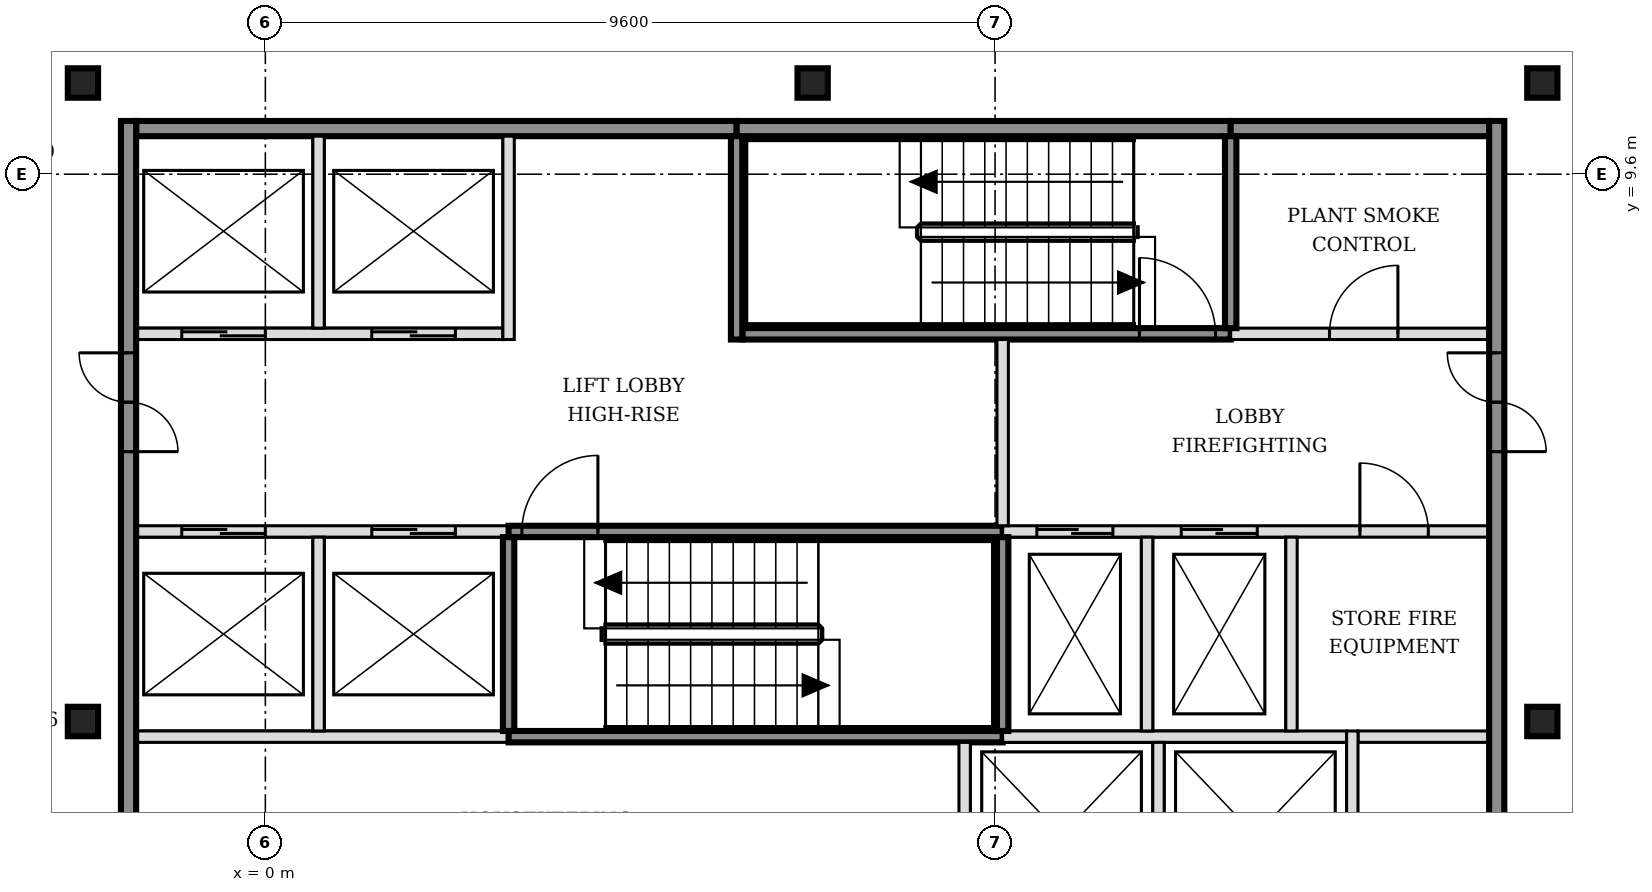
"""IFC4 building model, lengths in metres.
Left out: names, types, materials, properties, quantities, classifications, styles, units other than length and angle.
Written with IfcOpenShell. Run it as: python <this file> out.ifc"""

import sys

from ifc_helpers import new_model, si_unit, direction, frame, frame_2d, origin, origin_2d, place, context, subcontext, project, spatial, rectangle, i_section, extrude, element, fill, save


model = new_model("IFC4")
c1 = context("Model", 3, precision=1e-05, world=origin(), true_north=direction((0.0, 1.0)))
c2 = subcontext(c1, "Body", "Model", "MODEL_VIEW")
j1 = project(units=[si_unit("LENGTHUNIT", "METRE"), si_unit("PLANEANGLEUNIT", "RADIAN")], contexts=[c1])
p1 = place(None, origin())
s1 = spatial("IfcSite", under=j1, at=p1, CompositionType="ELEMENT")
p2 = place(p1, origin())
s2 = spatial("IfcBuilding", under=s1, at=p2, CompositionType="ELEMENT")
p3 = place(p2, frame((0.0, 0.0, 235.8)))
s3 = spatial("IfcBuildingStorey", under=s2, at=p3, CompositionType="ELEMENT", Elevation=235.8)
for number, where, z_axis, x_axis in (
    (1, (-2.4, 2.4, -0.15), (0.0, 0.0, 1.0), (1.0, 0.0, 0.0)),
    (2, (16.8, 2.4, -0.15), (0.0, 0.0, 1.0), (1.0, 0.0, 0.0)),
    (3, (-2.4, 10.8, -0.15), (0.0, 0.0, 1.0), (1.0, 0.0, 0.0)),
    (4, (7.2, 10.8, -0.15), (0.0, 0.0, 1.0), (1.0, 0.0, 0.0)),
    (5, (16.8, 10.8, -0.15), (0.0, 0.0, 1.0), (1.0, 0.0, 0.0)),
):
    element("IfcColumn", number, at=place(p3, frame(where, z_axis=z_axis, x_axis=x_axis)), inside=s3, PredefinedType="COLUMN", context=c2, shape_type="SweptSolid", body=[
        extrude(i_section(OverallWidth=0.398, OverallDepth=0.387, WebThickness=0.021, FlangeThickness=0.033, FilletRadius=0.015, at=origin_2d()), origin(), (0.0, 0.0, 1.0), 3.6),
    ])
p4 = place(p3, frame((-1.7, 2.2, 0.0), z_axis=(0.0, 0.0, 1.0), x_axis=(1.0, 0.0, 0.0)))
e6 = element("IfcWall", 6, at=p4, inside=s3, PredefinedType="SOLIDWALL", context=c2, shape_type="SweptSolid", body=[
    extrude(rectangle(XDim=4.9, YDim=0.15, at=frame_2d((2.45, 0.0))), origin(), (0.0, 0.0, 1.0), 3.45),
])
p5 = place(p3, frame((3.2, 2.2, 0.0), z_axis=(0.0, 0.0, 1.0), x_axis=(1.0, 0.0, 0.0)))
e7 = element("IfcWall", 7, at=p5, inside=s3, PredefinedType="SOLIDWALL", context=c2, shape_type="SweptSolid", body=[
    extrude(rectangle(XDim=6.5, YDim=0.15, at=frame_2d((3.25, 0.0))), origin(), (0.0, 0.0, 1.0), 3.45),
])
p6 = place(p3, frame((9.7, 2.2, 0.0), z_axis=(0.0, 0.0, 1.0), x_axis=(1.0, 0.0, 0.0)))
e8 = element("IfcWall", 8, at=p6, inside=s3, PredefinedType="SOLIDWALL", context=c2, shape_type="SweptSolid", body=[
    extrude(rectangle(XDim=4.525, YDim=0.15, at=frame_2d((2.263, 0.0))), origin(), (0.0, 0.0, 1.0), 3.45),
])
p7 = place(p3, frame((14.375, 2.2, 0.0), z_axis=(0.0, 0.0, 1.0), x_axis=(1.0, 0.0, 0.0)))
e9 = element("IfcWall", 9, at=p7, inside=s3, PredefinedType="PARTITIONING", context=c2, shape_type="SweptSolid", body=[
    extrude(rectangle(XDim=1.725, YDim=0.15, at=frame_2d((0.863, 0.0))), origin(), (0.0, 0.0, 1.0), 3.45),
])
p8 = place(p3, frame((-1.7, 4.9, 0.0), z_axis=(0.0, 0.0, 1.0), x_axis=(1.0, 0.0, 0.0)))
e10 = element("IfcWall", 10, at=p8, inside=s3, PredefinedType="SOLIDWALL", context=c2, shape_type="SweptSolid", body=[
    extrude(rectangle(XDim=4.9, YDim=0.15, at=frame_2d((2.45, 0.0))), origin(), (0.0, 0.0, 1.0), 3.45),
])
p9 = place(p8, frame((0.6, 0.0, 0.0)))
e11 = element("IfcOpeningElement", 11, at=p9, cuts=e10, PredefinedType="OPENING", context=c2, shape_type="SweptSolid", body=[
    extrude(rectangle(XDim=1.1, YDim=2.1, at=frame_2d((0.55, 1.05))), frame((0.0, 0.085, 0.0), z_axis=(0.0, -1.0, 0.0), x_axis=(1.0, 0.0, 0.0)), (0.0, 0.0, 1.0), 0.17),
])
p10 = place(p8, frame((3.1, 0.0, 0.0)))
e12 = element("IfcOpeningElement", 12, at=p10, cuts=e10, PredefinedType="OPENING", context=c2, shape_type="SweptSolid", body=[
    extrude(rectangle(XDim=1.1, YDim=2.1, at=frame_2d((0.55, 1.05))), frame((0.0, 0.085, 0.0), z_axis=(0.0, -1.0, 0.0), x_axis=(1.0, 0.0, 0.0)), (0.0, 0.0, 1.0), 0.17),
])
p11 = place(p3, frame((3.2, 4.9, 0.0), z_axis=(0.0, 0.0, 1.0), x_axis=(1.0, 0.0, 0.0)))
e13 = element("IfcWall", 13, at=p11, inside=s3, PredefinedType="SOLIDWALL", context=c2, shape_type="SweptSolid", body=[
    extrude(rectangle(XDim=6.5, YDim=0.15, at=frame_2d((3.25, 0.0))), origin(), (0.0, 0.0, 1.0), 3.45),
])
p12 = place(p11, frame((0.175, 0.0, 0.0)))
e14 = element("IfcOpeningElement", 14, at=p12, cuts=e13, PredefinedType="OPENING", context=c2, shape_type="SweptSolid", body=[
    extrude(rectangle(XDim=1.0, YDim=2.1, at=frame_2d((0.5, 1.05))), frame((0.0, 0.085, 0.0), z_axis=(0.0, -1.0, 0.0), x_axis=(1.0, 0.0, 0.0)), (0.0, 0.0, 1.0), 0.17),
])
p13 = place(p3, frame((9.7, 4.9, 0.0), z_axis=(0.0, 0.0, 1.0), x_axis=(1.0, 0.0, 0.0)))
e15 = element("IfcWall", 15, at=p13, inside=s3, PredefinedType="SOLIDWALL", context=c2, shape_type="SweptSolid", body=[
    extrude(rectangle(XDim=6.4, YDim=0.15, at=frame_2d((3.2, 0.0))), origin(), (0.0, 0.0, 1.0), 3.45),
])
p14 = place(p13, frame((0.45, 0.0, 0.0)))
e16 = element("IfcOpeningElement", 16, at=p14, cuts=e15, PredefinedType="OPENING", context=c2, shape_type="SweptSolid", body=[
    extrude(rectangle(XDim=1.0, YDim=2.1, at=frame_2d((0.5, 1.05))), frame((0.0, 0.085, 0.0), z_axis=(0.0, -1.0, 0.0), x_axis=(1.0, 0.0, 0.0)), (0.0, 0.0, 1.0), 0.17),
])
p15 = place(p13, frame((2.35, 0.0, 0.0)))
e17 = element("IfcOpeningElement", 17, at=p15, cuts=e15, PredefinedType="OPENING", context=c2, shape_type="SweptSolid", body=[
    extrude(rectangle(XDim=1.0, YDim=2.1, at=frame_2d((0.5, 1.05))), frame((0.0, 0.085, 0.0), z_axis=(0.0, -1.0, 0.0), x_axis=(1.0, 0.0, 0.0)), (0.0, 0.0, 1.0), 0.17),
])
p16 = place(p13, frame((4.7, 0.0, 0.0)))
e18 = element("IfcOpeningElement", 18, at=p16, cuts=e15, PredefinedType="OPENING", context=c2, shape_type="SweptSolid", body=[
    extrude(rectangle(XDim=0.9, YDim=2.1, at=frame_2d((0.45, 1.05))), frame((0.0, 0.085, 0.0), z_axis=(0.0, -1.0, 0.0), x_axis=(1.0, 0.0, 0.0)), (0.0, 0.0, 1.0), 0.17),
])
p17 = place(p3, frame((-1.7, 7.5, 0.0), z_axis=(0.0, 0.0, 1.0), x_axis=(1.0, 0.0, 0.0)))
e19 = element("IfcWall", 19, at=p17, inside=s3, PredefinedType="SOLIDWALL", context=c2, shape_type="SweptSolid", body=[
    extrude(rectangle(XDim=4.825, YDim=0.15, at=frame_2d((2.413, 0.0))), origin(), (0.0, 0.0, 1.0), 3.45),
])
p18 = place(p17, frame((0.6, 0.0, 0.0)))
e20 = element("IfcOpeningElement", 20, at=p18, cuts=e19, PredefinedType="OPENING", context=c2, shape_type="SweptSolid", body=[
    extrude(rectangle(XDim=1.1, YDim=2.1, at=frame_2d((0.55, 1.05))), frame((0.0, 0.085, 0.0), z_axis=(0.0, -1.0, 0.0), x_axis=(1.0, 0.0, 0.0)), (0.0, 0.0, 1.0), 0.17),
])
p19 = place(p17, frame((3.1, 0.0, 0.0)))
e21 = element("IfcOpeningElement", 21, at=p19, cuts=e19, PredefinedType="OPENING", context=c2, shape_type="SweptSolid", body=[
    extrude(rectangle(XDim=1.1, YDim=2.1, at=frame_2d((0.55, 1.05))), frame((0.0, 0.085, 0.0), z_axis=(0.0, -1.0, 0.0), x_axis=(1.0, 0.0, 0.0)), (0.0, 0.0, 1.0), 0.17),
])
p20 = place(p3, frame((6.275, 7.5, 0.0), z_axis=(0.0, 0.0, 1.0), x_axis=(1.0, 0.0, 0.0)))
e22 = element("IfcWall", 22, at=p20, inside=s3, PredefinedType="SOLIDWALL", context=c2, shape_type="SweptSolid", body=[
    extrude(rectangle(XDim=6.425, YDim=0.15, at=frame_2d((3.212, 0.0))), origin(), (0.0, 0.0, 1.0), 3.45),
])
p21 = place(p20, frame((5.225, 0.0, 0.0)))
e23 = element("IfcOpeningElement", 23, at=p21, cuts=e22, PredefinedType="OPENING", context=c2, shape_type="SweptSolid", body=[
    extrude(rectangle(XDim=1.0, YDim=2.1, at=frame_2d((0.5, 1.05))), frame((0.0, 0.085, 0.0), z_axis=(0.0, -1.0, 0.0), x_axis=(1.0, 0.0, 0.0)), (0.0, 0.0, 1.0), 0.17),
])
p22 = place(p3, frame((12.7, 7.5, 0.0), z_axis=(0.0, 0.0, 1.0), x_axis=(1.0, 0.0, 0.0)))
e24 = element("IfcWall", 24, at=p22, inside=s3, PredefinedType="SOLIDWALL", context=c2, shape_type="SweptSolid", body=[
    extrude(rectangle(XDim=3.4, YDim=0.15, at=frame_2d((1.7, 0.0))), origin(), (0.0, 0.0, 1.0), 3.45),
])
p23 = place(p22, frame((1.3, 0.0, 0.0)))
e25 = element("IfcOpeningElement", 25, at=p23, cuts=e24, PredefinedType="OPENING", context=c2, shape_type="SweptSolid", body=[
    extrude(rectangle(XDim=0.9, YDim=2.1, at=frame_2d((0.45, 1.05))), frame((0.0, 0.085, 0.0), z_axis=(0.0, -1.0, 0.0), x_axis=(1.0, 0.0, 0.0)), (0.0, 0.0, 1.0), 0.17),
])
p24 = place(p3, frame((-1.7, 10.2, 0.0), z_axis=(0.0, 0.0, 1.0), x_axis=(1.0, 0.0, 0.0)))
e26 = element("IfcWall", 26, at=p24, inside=s3, PredefinedType="SOLIDWALL", context=c2, shape_type="SweptSolid", body=[
    extrude(rectangle(XDim=7.9, YDim=0.2, at=frame_2d((3.95, 0.0))), origin(), (0.0, 0.0, 1.0), 3.45),
])
p25 = place(p3, frame((6.2, 10.2, 0.0), z_axis=(0.0, 0.0, 1.0), x_axis=(1.0, 0.0, 0.0)))
e27 = element("IfcWall", 27, at=p25, inside=s3, PredefinedType="SOLIDWALL", context=c2, shape_type="SweptSolid", body=[
    extrude(rectangle(XDim=6.5, YDim=0.2, at=frame_2d((3.25, 0.0))), origin(), (0.0, 0.0, 1.0), 3.45),
])
p26 = place(p3, frame((12.7, 10.2, 0.0), z_axis=(0.0, 0.0, 1.0), x_axis=(1.0, 0.0, 0.0)))
e28 = element("IfcWall", 28, at=p26, inside=s3, PredefinedType="SOLIDWALL", context=c2, shape_type="SweptSolid", body=[
    extrude(rectangle(XDim=3.4, YDim=0.2, at=frame_2d((1.7, 0.0))), origin(), (0.0, 0.0, 1.0), 3.45),
])
p27 = place(p3, frame((-1.8, -5.5, 0.0), z_axis=(0.0, 0.0, 1.0), x_axis=(0.0, 1.0, 0.0)))
e29 = element("IfcWall", 29, at=p27, inside=s3, PredefinedType="SOLIDWALL", context=c2, shape_type="SweptSolid", body=[
    extrude(rectangle(XDim=15.8, YDim=0.2, at=frame_2d((7.9, 0.0))), origin(), (0.0, 0.0, 1.0), 3.45),
])
p28 = place(p27, frame((3.05, 0.0, 0.0)))
e30 = element("IfcOpeningElement", 30, at=p28, cuts=e29, PredefinedType="OPENING", context=c2, shape_type="SweptSolid", body=[
    extrude(rectangle(XDim=1.3, YDim=2.1, at=frame_2d((0.65, 1.05))), frame((0.0, 0.11, 0.0), z_axis=(0.0, -1.0, 0.0), x_axis=(1.0, 0.0, 0.0)), (0.0, 0.0, 1.0), 0.22),
])
p29 = place(p27, frame((11.45, 0.0, 0.0)))
e31 = element("IfcOpeningElement", 31, at=p29, cuts=e29, PredefinedType="OPENING", context=c2, shape_type="SweptSolid", body=[
    extrude(rectangle(XDim=1.3, YDim=2.1, at=frame_2d((0.65, 1.05))), frame((0.0, 0.11, 0.0), z_axis=(0.0, -1.0, 0.0), x_axis=(1.0, 0.0, 0.0)), (0.0, 0.0, 1.0), 0.22),
])
p30 = place(p3, frame((0.7, 2.275, 0.0), z_axis=(0.0, 0.0, 1.0), x_axis=(0.0, 1.0, 0.0)))
e32 = element("IfcWall", 32, at=p30, inside=s3, PredefinedType="SOLIDWALL", context=c2, shape_type="SweptSolid", body=[
    extrude(rectangle(XDim=2.55, YDim=0.15, at=frame_2d((1.275, 0.0))), origin(), (0.0, 0.0, 1.0), 3.45),
])
p31 = place(p3, frame((0.7, 7.575, 0.0), z_axis=(0.0, 0.0, 1.0), x_axis=(0.0, 1.0, 0.0)))
e33 = element("IfcWall", 33, at=p31, inside=s3, PredefinedType="SOLIDWALL", context=c2, shape_type="SweptSolid", body=[
    extrude(rectangle(XDim=2.525, YDim=0.15, at=frame_2d((1.263, 0.0))), origin(), (0.0, 0.0, 1.0), 3.45),
])
p32 = place(p3, frame((3.2, 2.275, 0.0), z_axis=(0.0, 0.0, 1.0), x_axis=(0.0, 1.0, 0.0)))
e34 = element("IfcWall", 34, at=p32, inside=s3, PredefinedType="SOLIDWALL", context=c2, shape_type="SweptSolid", body=[
    extrude(rectangle(XDim=2.55, YDim=0.15, at=frame_2d((1.275, 0.0))), origin(), (0.0, 0.0, 1.0), 3.45),
])
for number, where, z_axis, x_axis in (
    (35, (3.2, 7.425, 0.0), (0.0, 0.0, 1.0), (0.0, 1.0, 0.0)),
    (36, (6.2, 7.425, 0.0), (0.0, 0.0, 1.0), (0.0, 1.0, 0.0)),
):
    element("IfcWall", number, at=place(p3, frame(where, z_axis=z_axis, x_axis=x_axis)), inside=s3, PredefinedType="SOLIDWALL", context=c2, shape_type="SweptSolid", body=[
        extrude(rectangle(XDim=2.675, YDim=0.15, at=frame_2d((1.337, 0.0))), origin(), (0.0, 0.0, 1.0), 3.45),
    ])
p33 = place(p3, frame((9.2, -0.475, 0.0), z_axis=(0.0, 0.0, 1.0), x_axis=(0.0, 1.0, 0.0)))
e37 = element("IfcWall", 37, at=p33, inside=s3, PredefinedType="SOLIDWALL", context=c2, shape_type="SweptSolid", body=[
    extrude(rectangle(XDim=2.6, YDim=0.15, at=frame_2d((1.3, 0.0))), origin(), (0.0, 0.0, 1.0), 3.45),
])
p34 = place(p3, frame((9.7, 2.275, 0.0), z_axis=(0.0, 0.0, 1.0), x_axis=(0.0, 1.0, 0.0)))
e38 = element("IfcWall", 38, at=p34, inside=s3, PredefinedType="SOLIDWALL", context=c2, shape_type="SweptSolid", body=[
    extrude(rectangle(XDim=2.55, YDim=0.15, at=frame_2d((1.275, 0.0))), origin(), (0.0, 0.0, 1.0), 3.45),
])
p35 = place(p3, frame((9.7, 4.975, 0.0), z_axis=(0.0, 0.0, 1.0), x_axis=(0.0, 1.0, 0.0)))
e39 = element("IfcWall", 39, at=p35, inside=s3, PredefinedType="SOLIDWALL", context=c2, shape_type="SweptSolid", body=[
    extrude(rectangle(XDim=2.45, YDim=0.15, at=frame_2d((1.225, 0.0))), origin(), (0.0, 0.0, 1.0), 3.45),
])
p36 = place(p3, frame((11.6, 2.275, 0.0), z_axis=(0.0, 0.0, 1.0), x_axis=(0.0, 1.0, 0.0)))
e40 = element("IfcWall", 40, at=p36, inside=s3, PredefinedType="SOLIDWALL", context=c2, shape_type="SweptSolid", body=[
    extrude(rectangle(XDim=2.55, YDim=0.15, at=frame_2d((1.275, 0.0))), origin(), (0.0, 0.0, 1.0), 3.45),
])
p37 = place(p3, frame((11.75, -0.325, 0.0), z_axis=(0.0, 0.0, 1.0), x_axis=(0.0, 1.0, 0.0)))
e41 = element("IfcWall", 41, at=p37, inside=s3, PredefinedType="SOLIDWALL", context=c2, shape_type="SweptSolid", body=[
    extrude(rectangle(XDim=2.45, YDim=0.15, at=frame_2d((1.225, 0.0))), origin(), (0.0, 0.0, 1.0), 3.45),
])
p38 = place(p3, frame((12.7, 7.575, 0.0), z_axis=(0.0, 0.0, 1.0), x_axis=(0.0, 1.0, 0.0)))
e42 = element("IfcWall", 42, at=p38, inside=s3, PredefinedType="SOLIDWALL", context=c2, shape_type="SweptSolid", body=[
    extrude(rectangle(XDim=2.525, YDim=0.15, at=frame_2d((1.263, 0.0))), origin(), (0.0, 0.0, 1.0), 3.45),
])
p39 = place(p3, frame((13.5, 2.275, 0.0), z_axis=(0.0, 0.0, 1.0), x_axis=(0.0, 1.0, 0.0)))
e43 = element("IfcWall", 43, at=p39, inside=s3, PredefinedType="SOLIDWALL", context=c2, shape_type="SweptSolid", body=[
    extrude(rectangle(XDim=2.55, YDim=0.15, at=frame_2d((1.275, 0.0))), origin(), (0.0, 0.0, 1.0), 3.45),
])
p40 = place(p3, frame((14.3, -0.475, 0.0), z_axis=(0.0, 0.0, 1.0), x_axis=(0.0, 1.0, 0.0)))
e44 = element("IfcWall", 44, at=p40, inside=s3, PredefinedType="SOLIDWALL", context=c2, shape_type="SweptSolid", body=[
    extrude(rectangle(XDim=2.75, YDim=0.15, at=frame_2d((1.375, 0.0))), origin(), (0.0, 0.0, 1.0), 3.45),
])
p41 = place(p3, frame((16.2, -5.5, 0.0), z_axis=(0.0, 0.0, 1.0), x_axis=(0.0, 1.0, 0.0)))
e45 = element("IfcWall", 45, at=p41, inside=s3, PredefinedType="SOLIDWALL", context=c2, shape_type="SweptSolid", body=[
    extrude(rectangle(XDim=15.8, YDim=0.2, at=frame_2d((7.9, 0.0))), origin(), (0.0, 0.0, 1.0), 3.45),
])
p42 = place(p41, frame((3.05, 0.0, 0.0)))
e46 = element("IfcOpeningElement", 46, at=p42, cuts=e45, PredefinedType="OPENING", context=c2, shape_type="SweptSolid", body=[
    extrude(rectangle(XDim=1.3, YDim=2.1, at=frame_2d((0.65, 1.05))), frame((0.0, 0.11, 0.0), z_axis=(0.0, -1.0, 0.0), x_axis=(1.0, 0.0, 0.0)), (0.0, 0.0, 1.0), 0.22),
])
p43 = place(p41, frame((11.45, 0.0, 0.0)))
e47 = element("IfcOpeningElement", 47, at=p43, cuts=e45, PredefinedType="OPENING", context=c2, shape_type="SweptSolid", body=[
    extrude(rectangle(XDim=1.3, YDim=2.1, at=frame_2d((0.65, 1.05))), frame((0.0, 0.11, 0.0), z_axis=(0.0, -1.0, 0.0), x_axis=(1.0, 0.0, 0.0)), (0.0, 0.0, 1.0), 0.22),
])
p44 = place(p9, origin())
e48 = element("IfcDoor", 48, at=p44, inside=s3, OperationType="DOUBLE_DOOR_SLIDING", PredefinedType="DOOR", context=c2, shape_type="SweptSolid", body=[
    extrude(rectangle(XDim=1.1, YDim=2.1, at=frame_2d((0.55, 1.05))), frame((0.0, 0.025, 0.0), z_axis=(0.0, -1.0, 0.0), x_axis=(1.0, 0.0, 0.0)), (0.0, 0.0, 1.0), 0.05),
])
fill(e11, e48)
p45 = place(p10, origin())
e49 = element("IfcDoor", 49, at=p45, inside=s3, OperationType="DOUBLE_DOOR_SLIDING", PredefinedType="DOOR", context=c2, shape_type="SweptSolid", body=[
    extrude(rectangle(XDim=1.1, YDim=2.1, at=frame_2d((0.55, 1.05))), frame((0.0, 0.025, 0.0), z_axis=(0.0, -1.0, 0.0), x_axis=(1.0, 0.0, 0.0)), (0.0, 0.0, 1.0), 0.05),
])
fill(e12, e49)
p46 = place(p18, origin())
e50 = element("IfcDoor", 50, at=p46, inside=s3, OperationType="DOUBLE_DOOR_SLIDING", PredefinedType="DOOR", context=c2, shape_type="SweptSolid", body=[
    extrude(rectangle(XDim=1.1, YDim=2.1, at=frame_2d((0.55, 1.05))), frame((0.0, 0.025, 0.0), z_axis=(0.0, -1.0, 0.0), x_axis=(1.0, 0.0, 0.0)), (0.0, 0.0, 1.0), 0.05),
])
fill(e20, e50)
p47 = place(p19, origin())
e51 = element("IfcDoor", 51, at=p47, inside=s3, OperationType="DOUBLE_DOOR_SLIDING", PredefinedType="DOOR", context=c2, shape_type="SweptSolid", body=[
    extrude(rectangle(XDim=1.1, YDim=2.1, at=frame_2d((0.55, 1.05))), frame((0.0, 0.025, 0.0), z_axis=(0.0, -1.0, 0.0), x_axis=(1.0, 0.0, 0.0)), (0.0, 0.0, 1.0), 0.05),
])
fill(e21, e51)
p48 = place(p14, origin())
e52 = element("IfcDoor", 52, at=p48, inside=s3, OperationType="DOUBLE_DOOR_SLIDING", PredefinedType="DOOR", context=c2, shape_type="SweptSolid", body=[
    extrude(rectangle(XDim=1.0, YDim=2.1, at=frame_2d((0.5, 1.05))), frame((0.0, 0.025, 0.0), z_axis=(0.0, -1.0, 0.0), x_axis=(1.0, 0.0, 0.0)), (0.0, 0.0, 1.0), 0.05),
])
fill(e16, e52)
p49 = place(p15, origin())
e53 = element("IfcDoor", 53, at=p49, inside=s3, OperationType="DOUBLE_DOOR_SLIDING", PredefinedType="DOOR", context=c2, shape_type="SweptSolid", body=[
    extrude(rectangle(XDim=1.0, YDim=2.1, at=frame_2d((0.5, 1.05))), frame((0.0, 0.025, 0.0), z_axis=(0.0, -1.0, 0.0), x_axis=(1.0, 0.0, 0.0)), (0.0, 0.0, 1.0), 0.05),
])
fill(e17, e53)
p50 = place(p12, origin())
e54 = element("IfcDoor", 54, at=p50, inside=s3, OperationType="SINGLE_SWING_RIGHT", PredefinedType="DOOR", context=c2, shape_type="SweptSolid", body=[
    extrude(rectangle(XDim=1.0, YDim=2.1, at=frame_2d((0.5, 1.05))), frame((0.0, 0.025, 0.0), z_axis=(0.0, -1.0, 0.0), x_axis=(1.0, 0.0, 0.0)), (0.0, 0.0, 1.0), 0.05),
])
fill(e14, e54)
p51 = place(p21, origin())
e55 = element("IfcDoor", 55, at=p51, inside=s3, OperationType="SINGLE_SWING_LEFT", PredefinedType="DOOR", context=c2, shape_type="SweptSolid", body=[
    extrude(rectangle(XDim=1.0, YDim=2.1, at=frame_2d((0.5, 1.05))), frame((0.0, 0.025, 0.0), z_axis=(0.0, -1.0, 0.0), x_axis=(1.0, 0.0, 0.0)), (0.0, 0.0, 1.0), 0.05),
])
fill(e23, e55)
p52 = place(p29, origin())
e56 = element("IfcDoor", 56, at=p52, inside=s3, OperationType="DOUBLE_DOOR_SINGLE_SWING", PredefinedType="DOOR", context=c2, shape_type="SweptSolid", body=[
    extrude(rectangle(XDim=1.3, YDim=2.1, at=frame_2d((0.65, 1.05))), frame((0.0, 0.025, 0.0), z_axis=(0.0, -1.0, 0.0), x_axis=(1.0, 0.0, 0.0)), (0.0, 0.0, 1.0), 0.05),
])
fill(e31, e56)
p53 = place(p43, origin())
e57 = element("IfcDoor", 57, at=p53, inside=s3, OperationType="DOUBLE_DOOR_SINGLE_SWING", PredefinedType="DOOR", context=c2, shape_type="SweptSolid", body=[
    extrude(rectangle(XDim=1.3, YDim=2.1, at=frame_2d((0.65, 1.05))), frame((0.0, 0.025, 0.0), z_axis=(0.0, -1.0, 0.0), x_axis=(1.0, 0.0, 0.0)), (0.0, 0.0, 1.0), 0.05),
])
fill(e47, e57)
p54 = place(p16, origin())
e58 = element("IfcDoor", 58, at=p54, inside=s3, OperationType="SINGLE_SWING_LEFT", PredefinedType="DOOR", context=c2, shape_type="SweptSolid", body=[
    extrude(rectangle(XDim=0.9, YDim=2.1, at=frame_2d((0.45, 1.05))), frame((0.0, 0.025, 0.0), z_axis=(0.0, -1.0, 0.0), x_axis=(1.0, 0.0, 0.0)), (0.0, 0.0, 1.0), 0.05),
])
fill(e18, e58)
p55 = place(p23, origin())
e59 = element("IfcDoor", 59, at=p55, inside=s3, OperationType="SINGLE_SWING_RIGHT", PredefinedType="DOOR", context=c2, shape_type="SweptSolid", body=[
    extrude(rectangle(XDim=0.9, YDim=2.1, at=frame_2d((0.45, 1.05))), frame((0.0, 0.025, 0.0), z_axis=(0.0, -1.0, 0.0), x_axis=(1.0, 0.0, 0.0)), (0.0, 0.0, 1.0), 0.05),
])
fill(e25, e59)
save(model, sys.argv[1])
